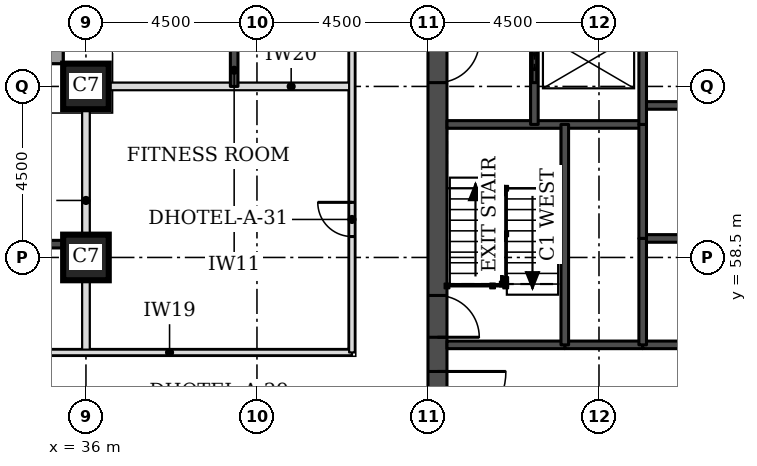
"""IFC4 building model, lengths in metres.
Left out: names, types, materials, properties, quantities, classifications, styles, units other than length and angle.
Written with IfcOpenShell. Run it as: python <this file> out.ifc"""

import sys

from ifc_helpers import new_model, si_unit, direction, frame, frame_2d, origin, origin_2d, place, context, subcontext, project, spatial, rectangle, extrude, element, fill, save


model = new_model("IFC4")
c1 = context("Model", 3, precision=1e-05, world=origin(), true_north=direction((0.0, 1.0)))
c2 = subcontext(c1, "Body", "Model", "MODEL_VIEW")
j1 = project(units=[si_unit("LENGTHUNIT", "METRE"), si_unit("PLANEANGLEUNIT", "RADIAN")], contexts=[c1])
p1 = place(None, origin())
s1 = spatial("IfcSite", under=j1, at=p1, CompositionType="ELEMENT")
p2 = place(p1, origin())
s2 = spatial("IfcBuilding", under=s1, at=p2, CompositionType="ELEMENT")
p3 = place(p2, frame((0.0, 0.0, 26.4)))
s3 = spatial("IfcBuildingStorey", under=s2, at=p3, CompositionType="ELEMENT", Elevation=26.4)
for number, where, z_axis, x_axis in (
    (1, (36.0, 58.5, 0.0), (0.0, 0.0, 1.0), (1.0, 0.0, 0.0)),
    (2, (36.0, 63.0, 0.0), (0.0, 0.0, 1.0), (1.0, 0.0, 0.0)),
):
    element("IfcColumn", number, at=place(p3, frame(where, z_axis=z_axis, x_axis=x_axis)), inside=s3, PredefinedType="COLUMN", context=c2, shape_type="SweptSolid", body=[
        extrude(rectangle(XDim=1.2, YDim=1.2, at=origin_2d()), origin(), (0.0, 0.0, 1.0), 3.3),
    ])
p4 = place(p3, frame((45.25, 49.5, 0.0), z_axis=(0.0, 0.0, 1.0), x_axis=(0.0, 1.0, 0.0)))
e3 = element("IfcWall", 3, at=p4, inside=s3, PredefinedType="SHEAR", context=c2, shape_type="SweptSolid", body=[
    extrude(rectangle(XDim=22.5, YDim=0.5, at=frame_2d((11.25, 0.0))), origin(), (0.0, 0.0, 1.0), 3.3),
])
p5 = place(p4, frame((4.2, 0.0, 0.0)))
e4 = element("IfcOpeningElement", 4, at=p5, cuts=e3, PredefinedType="OPENING", context=c2, shape_type="SweptSolid", body=[
    extrude(rectangle(XDim=1.8, YDim=2.1, at=frame_2d((0.9, 1.05))), frame((0.0, 0.26, 0.0), z_axis=(0.0, -1.0, 0.0), x_axis=(1.0, 0.0, 0.0)), (0.0, 0.0, 1.0), 0.52),
])
p6 = place(p4, frame((6.9, 0.0, 0.0)))
e5 = element("IfcOpeningElement", 5, at=p6, cuts=e3, PredefinedType="OPENING", context=c2, shape_type="SweptSolid", body=[
    extrude(rectangle(XDim=1.1, YDim=2.1, at=frame_2d((0.55, 1.05))), frame((0.0, 0.26, 0.0), z_axis=(0.0, -1.0, 0.0), x_axis=(1.0, 0.0, 0.0)), (0.0, 0.0, 1.0), 0.52),
])
p7 = place(p4, frame((13.6, 0.0, 0.0)))
e6 = element("IfcOpeningElement", 6, at=p7, cuts=e3, PredefinedType="OPENING", context=c2, shape_type="SweptSolid", body=[
    extrude(rectangle(XDim=1.1, YDim=2.1, at=frame_2d((0.55, 1.05))), frame((0.0, 0.26, 0.0), z_axis=(0.0, -1.0, 0.0), x_axis=(1.0, 0.0, 0.0)), (0.0, 0.0, 1.0), 0.52),
])
p8 = place(p4, frame((16.5, 0.0, 0.0)))
e7 = element("IfcOpeningElement", 7, at=p8, cuts=e3, PredefinedType="OPENING", context=c2, shape_type="SweptSolid", body=[
    extrude(rectangle(XDim=1.8, YDim=2.1, at=frame_2d((0.9, 1.05))), frame((0.0, 0.26, 0.0), z_axis=(0.0, -1.0, 0.0), x_axis=(1.0, 0.0, 0.0)), (0.0, 0.0, 1.0), 0.52),
])
p9 = place(p3, frame((35.225, 76.894, 0.0), z_axis=(0.0, 0.0, 1.0), x_axis=(0.0, -1.0, 0.0)))
e8 = element("IfcWall", 8, at=p9, inside=s3, PredefinedType="STANDARD", context=c2, shape_type="SweptSolid", body=[
    extrude(rectangle(XDim=13.293, YDim=0.35, at=frame_2d((6.647, 0.0))), origin(), (0.0, 0.0, 1.0), 3.055),
])
p10 = place(p9, frame((9.493, 0.0, 0.8)))
e9 = element("IfcOpeningElement", 9, at=p10, cuts=e8, PredefinedType="OPENING", context=c2, shape_type="SweptSolid", body=[
    extrude(rectangle(XDim=3.3, YDim=1.5, at=frame_2d((1.65, 0.75))), frame((0.0, 0.185, 0.0), z_axis=(0.0, -1.0, 0.0), x_axis=(1.0, 0.0, 0.0)), (0.0, 0.0, 1.0), 0.37),
])
p11 = place(p3, frame((35.4, 63.775, 0.0), z_axis=(0.0, 0.0, 1.0), x_axis=(-1.0, 0.0, 0.0)))
e10 = element("IfcWall", 10, at=p11, inside=s3, PredefinedType="STANDARD", context=c2, shape_type="SweptSolid", body=[
    extrude(rectangle(XDim=17.793, YDim=0.35, at=frame_2d((8.897, 0.0))), origin(), (0.0, 0.0, 1.0), 3.055),
])
p12 = place(p11, frame((0.5, 0.0, 0.8)))
e11 = element("IfcOpeningElement", 11, at=p12, cuts=e10, PredefinedType="OPENING", context=c2, shape_type="SweptSolid", body=[
    extrude(rectangle(XDim=3.3, YDim=1.5, at=frame_2d((1.65, 0.75))), frame((0.0, 0.185, 0.0), z_axis=(0.0, -1.0, 0.0), x_axis=(1.0, 0.0, 0.0)), (0.0, 0.0, 1.0), 0.37),
])
p13 = place(p11, frame((9.0, 0.0, 0.8)))
e12 = element("IfcOpeningElement", 12, at=p13, cuts=e10, PredefinedType="OPENING", context=c2, shape_type="SweptSolid", body=[
    extrude(rectangle(XDim=3.3, YDim=1.5, at=frame_2d((1.65, 0.75))), frame((0.0, 0.185, 0.0), z_axis=(0.0, -1.0, 0.0), x_axis=(1.0, 0.0, 0.0)), (0.0, 0.0, 1.0), 0.37),
])
p14 = place(p3, frame((36.0, 56.0, 0.0), z_axis=(0.0, 0.0, 1.0), x_axis=(0.0, 1.0, 0.0)))
e13 = element("IfcWall", 13, at=p14, inside=s3, PredefinedType="PARTITIONING", context=c2, shape_type="SweptSolid", body=[
    extrude(rectangle(XDim=6.4, YDim=0.2, at=frame_2d((3.2, 0.0))), origin(), (0.0, 0.0, 1.0), 2.33),
])
p15 = place(p3, frame((36.6, 63.0, 0.0), z_axis=(0.0, 0.0, 1.0), x_axis=(1.0, 0.0, 0.0)))
e14 = element("IfcWall", 14, at=p15, inside=s3, PredefinedType="PARTITIONING", context=c2, shape_type="SweptSolid", body=[
    extrude(rectangle(XDim=6.4, YDim=0.2, at=frame_2d((3.2, 0.0))), origin(), (0.0, 0.0, 1.0), 3.08),
])
p16 = place(p3, frame((27.0, 56.0, 0.0), z_axis=(0.0, 0.0, 1.0), x_axis=(1.0, 0.0, 0.0)))
e15 = element("IfcWall", 15, at=p16, inside=s3, PredefinedType="PARTITIONING", context=c2, shape_type="SweptSolid", body=[
    extrude(rectangle(XDim=16.0, YDim=0.15, at=frame_2d((8.0, 0.0))), origin(), (0.0, 0.0, 1.0), 3.08),
])
p17 = place(p16, frame((2.775, 0.0, 0.0)))
e16 = element("IfcOpeningElement", 16, at=p17, cuts=e15, PredefinedType="OPENING", context=c2, shape_type="SweptSolid", body=[
    extrude(rectangle(XDim=1.0, YDim=2.1, at=frame_2d((0.5, 1.05))), frame((0.0, 0.085, 0.0), z_axis=(0.0, -1.0, 0.0), x_axis=(1.0, 0.0, 0.0)), (0.0, 0.0, 1.0), 0.17),
])
p18 = place(p3, frame((43.0, 56.0, 0.0), z_axis=(0.0, 0.0, 1.0), x_axis=(0.0, 1.0, 0.0)))
e17 = element("IfcWall", 17, at=p18, inside=s3, PredefinedType="PARTITIONING", context=c2, shape_type="SweptSolid", body=[
    extrude(rectangle(XDim=18.0, YDim=0.15, at=frame_2d((9.0, 0.0))), origin(), (0.0, 0.0, 1.0), 3.08),
])
p19 = place(p18, frame((12.225, 0.0, 0.0)))
e18 = element("IfcOpeningElement", 18, at=p19, cuts=e17, PredefinedType="OPENING", context=c2, shape_type="SweptSolid", body=[
    extrude(rectangle(XDim=1.0, YDim=2.1, at=frame_2d((0.5, 1.05))), frame((0.0, 0.085, 0.0), z_axis=(0.0, -1.0, 0.0), x_axis=(1.0, 0.0, 0.0)), (0.0, 0.0, 1.0), 0.17),
])
p20 = place(p18, frame((16.553, 0.0, 0.0)))
e19 = element("IfcOpeningElement", 19, at=p20, cuts=e17, PredefinedType="OPENING", context=c2, shape_type="SweptSolid", body=[
    extrude(rectangle(XDim=1.0, YDim=2.1, at=frame_2d((0.5, 1.05))), frame((0.0, 0.085, 0.0), z_axis=(0.0, -1.0, 0.0), x_axis=(1.0, 0.0, 0.0)), (0.0, 0.0, 1.0), 0.17),
])
p21 = place(p18, frame((3.05, 0.0, 0.0)))
e20 = element("IfcOpeningElement", 20, at=p21, cuts=e17, PredefinedType="OPENING", context=c2, shape_type="SweptSolid", body=[
    extrude(rectangle(XDim=0.9, YDim=2.1, at=frame_2d((0.45, 1.05))), frame((0.0, 0.085, 0.0), z_axis=(0.0, -1.0, 0.0), x_axis=(1.0, 0.0, 0.0)), (0.0, 0.0, 1.0), 0.17),
])
for number, where, z_axis, x_axis in (
    (21, (33.55, 58.85, 0.0), (0.0, 0.0, 1.0), (1.0, 0.0, 0.0)),
    (22, (39.9, 63.0, 0.0), (0.0, 0.0, 1.0), (0.0, 1.0, 0.0)),
):
    element("IfcWall", number, at=place(p3, frame(where, z_axis=z_axis, x_axis=x_axis)), inside=s3, PredefinedType="SOLIDWALL", context=c2, shape_type="SweptSolid", body=[
        extrude(rectangle(XDim=2.45, YDim=0.2, at=frame_2d((1.225, 0.0))), origin(), (0.0, 0.0, 1.0), 3.08),
    ])
p22 = place(p3, frame((48.6, 56.2, 0.0), z_axis=(0.0, 0.0, 1.0), x_axis=(1.0, 0.0, 0.0)))
e23 = element("IfcWall", 23, at=p22, inside=s3, PredefinedType="SOLIDWALL", context=c2, shape_type="SweptSolid", body=[
    extrude(rectangle(XDim=2.05, YDim=0.2, at=frame_2d((1.025, 0.0))), origin(), (0.0, 0.0, 1.0), 3.08),
])
p23 = place(p3, frame((45.5, 56.2, 0.0), z_axis=(0.0, 0.0, 1.0), x_axis=(1.0, 0.0, 0.0)))
e24 = element("IfcWall", 24, at=p23, inside=s3, PredefinedType="SOLIDWALL", context=c2, shape_type="SweptSolid", body=[
    extrude(rectangle(XDim=3.1, YDim=0.2, at=frame_2d((1.55, 0.0))), origin(), (0.0, 0.0, 1.0), 3.08),
])
p24 = place(p3, frame((50.65, 56.2, 0.0), z_axis=(0.0, 0.0, 1.0), x_axis=(1.0, 0.0, 0.0)))
e25 = element("IfcWall", 25, at=p24, inside=s3, PredefinedType="SOLIDWALL", context=c2, shape_type="SweptSolid", body=[
    extrude(rectangle(XDim=11.2, YDim=0.2, at=frame_2d((5.6, 0.0))), origin(), (0.0, 0.0, 1.0), 3.08),
])
p25 = place(p3, frame((50.65, 59.0, 0.0), z_axis=(0.0, 0.0, 1.0), x_axis=(1.0, 0.0, 0.0)))
e26 = element("IfcWall", 26, at=p25, inside=s3, PredefinedType="SOLIDWALL", context=c2, shape_type="SweptSolid", body=[
    extrude(rectangle(XDim=11.2, YDim=0.2, at=frame_2d((5.6, 0.0))), origin(), (0.0, 0.0, 1.0), 3.3),
])
p26 = place(p3, frame((45.5, 62.0, 0.0), z_axis=(0.0, 0.0, 1.0), x_axis=(1.0, 0.0, 0.0)))
e27 = element("IfcWall", 27, at=p26, inside=s3, PredefinedType="SOLIDWALL", context=c2, shape_type="SweptSolid", body=[
    extrude(rectangle(XDim=5.15, YDim=0.2, at=frame_2d((2.575, 0.0))), origin(), (0.0, 0.0, 1.0), 3.08),
])
p27 = place(p3, frame((50.65, 62.5, 0.0), z_axis=(0.0, 0.0, 1.0), x_axis=(1.0, 0.0, 0.0)))
e28 = element("IfcWall", 28, at=p27, inside=s3, PredefinedType="SOLIDWALL", context=c2, shape_type="SweptSolid", body=[
    extrude(rectangle(XDim=11.2, YDim=0.2, at=frame_2d((5.6, 0.0))), origin(), (0.0, 0.0, 1.0), 3.3),
])
p28 = place(p3, frame((47.8, 62.0, 0.0), z_axis=(0.0, 0.0, 1.0), x_axis=(0.0, 1.0, 0.0)))
e29 = element("IfcWall", 29, at=p28, inside=s3, PredefinedType="SOLIDWALL", context=c2, shape_type="SweptSolid", body=[
    extrude(rectangle(XDim=3.3, YDim=0.2, at=frame_2d((1.65, 0.0))), origin(), (0.0, 0.0, 1.0), 3.08),
])
p29 = place(p28, frame((1.1, 0.0, 0.0)))
e30 = element("IfcOpeningElement", 30, at=p29, cuts=e29, PredefinedType="OPENING", context=c2, shape_type="SweptSolid", body=[
    extrude(rectangle(XDim=1.1, YDim=2.1, at=frame_2d((0.55, 1.05))), frame((0.0, 0.11, 0.0), z_axis=(0.0, -1.0, 0.0), x_axis=(1.0, 0.0, 0.0)), (0.0, 0.0, 1.0), 0.22),
])
p30 = place(p3, frame((48.6, 56.2, 0.0), z_axis=(0.0, 0.0, 1.0), x_axis=(0.0, 1.0, 0.0)))
e31 = element("IfcWall", 31, at=p30, inside=s3, PredefinedType="SOLIDWALL", context=c2, shape_type="SweptSolid", body=[
    extrude(rectangle(XDim=5.8, YDim=0.2, at=frame_2d((2.9, 0.0))), origin(), (0.0, 0.0, 1.0), 3.08),
])
p31 = place(p3, frame((50.65, 59.0, 0.0), z_axis=(0.0, 0.0, 1.0), x_axis=(0.0, 1.0, 0.0)))
e32 = element("IfcWall", 32, at=p31, inside=s3, PredefinedType="SOLIDWALL", context=c2, shape_type="SweptSolid", body=[
    extrude(rectangle(XDim=3.0, YDim=0.2, at=frame_2d((1.5, 0.0))), origin(), (0.0, 0.0, 1.0), 3.3),
])
p32 = place(p3, frame((50.65, 56.2, 0.0), z_axis=(0.0, 0.0, 1.0), x_axis=(0.0, 1.0, 0.0)))
e33 = element("IfcWall", 33, at=p32, inside=s3, PredefinedType="SOLIDWALL", context=c2, shape_type="SweptSolid", body=[
    extrude(rectangle(XDim=2.8, YDim=0.2, at=frame_2d((1.4, 0.0))), origin(), (0.0, 0.0, 1.0), 3.08),
])
p33 = place(p3, frame((50.65, 62.0, 0.0), z_axis=(0.0, 0.0, 1.0), x_axis=(0.0, 1.0, 0.0)))
e34 = element("IfcWall", 34, at=p33, inside=s3, PredefinedType="SOLIDWALL", context=c2, shape_type="SweptSolid", body=[
    extrude(rectangle(XDim=3.3, YDim=0.2, at=frame_2d((1.65, 0.0))), origin(), (0.0, 0.0, 1.0), 3.08),
])
p34 = place(p21, origin())
e35 = element("IfcDoor", 35, at=p34, inside=s3, OperationType="SINGLE_SWING_RIGHT", PredefinedType="DOOR", context=c2, shape_type="SweptSolid", body=[
    extrude(rectangle(XDim=0.9, YDim=2.1, at=frame_2d((0.45, 1.05))), frame((0.0, 0.025, 0.0), z_axis=(0.0, -1.0, 0.0), x_axis=(1.0, 0.0, 0.0)), (0.0, 0.0, 1.0), 0.05),
])
fill(e20, e35)
p35 = place(p29, origin())
e36 = element("IfcDoor", 36, at=p35, inside=s3, OperationType="DOUBLE_DOOR_SLIDING", PredefinedType="DOOR", context=c2, shape_type="SweptSolid", body=[
    extrude(rectangle(XDim=1.1, YDim=2.1, at=frame_2d((0.55, 1.05))), frame((0.0, 0.025, 0.0), z_axis=(0.0, -1.0, 0.0), x_axis=(1.0, 0.0, 0.0)), (0.0, 0.0, 1.0), 0.05),
])
fill(e30, e36)
p36 = place(p5, frame((1.8, 0.0, 0.0), z_axis=(0.0, 0.0, 1.0), x_axis=(-1.0, 0.0, 0.0)))
e37 = element("IfcDoor", 37, at=p36, inside=s3, OperationType="SINGLE_SWING_LEFT", PredefinedType="DOOR", context=c2, shape_type="SweptSolid", body=[
    extrude(rectangle(XDim=1.8, YDim=2.1, at=frame_2d((0.9, 1.05))), frame((0.0, 0.025, 0.0), z_axis=(0.0, -1.0, 0.0), x_axis=(1.0, 0.0, 0.0)), (0.0, 0.0, 1.0), 0.05),
])
fill(e4, e37)
p37 = place(p6, frame((1.1, 0.0, 0.0), z_axis=(0.0, 0.0, 1.0), x_axis=(-1.0, 0.0, 0.0)))
e38 = element("IfcDoor", 38, at=p37, inside=s3, OperationType="SINGLE_SWING_RIGHT", PredefinedType="DOOR", context=c2, shape_type="SweptSolid", body=[
    extrude(rectangle(XDim=1.1, YDim=2.1, at=frame_2d((0.55, 1.05))), frame((0.0, 0.025, 0.0), z_axis=(0.0, -1.0, 0.0), x_axis=(1.0, 0.0, 0.0)), (0.0, 0.0, 1.0), 0.05),
])
fill(e5, e38)
p38 = place(p7, frame((1.1, 0.0, 0.0), z_axis=(0.0, 0.0, 1.0), x_axis=(-1.0, 0.0, 0.0)))
e39 = element("IfcDoor", 39, at=p38, inside=s3, OperationType="SINGLE_SWING_LEFT", PredefinedType="DOOR", context=c2, shape_type="SweptSolid", body=[
    extrude(rectangle(XDim=1.1, YDim=2.1, at=frame_2d((0.55, 1.05))), frame((0.0, 0.025, 0.0), z_axis=(0.0, -1.0, 0.0), x_axis=(1.0, 0.0, 0.0)), (0.0, 0.0, 1.0), 0.05),
])
fill(e6, e39)
save(model, sys.argv[1])
